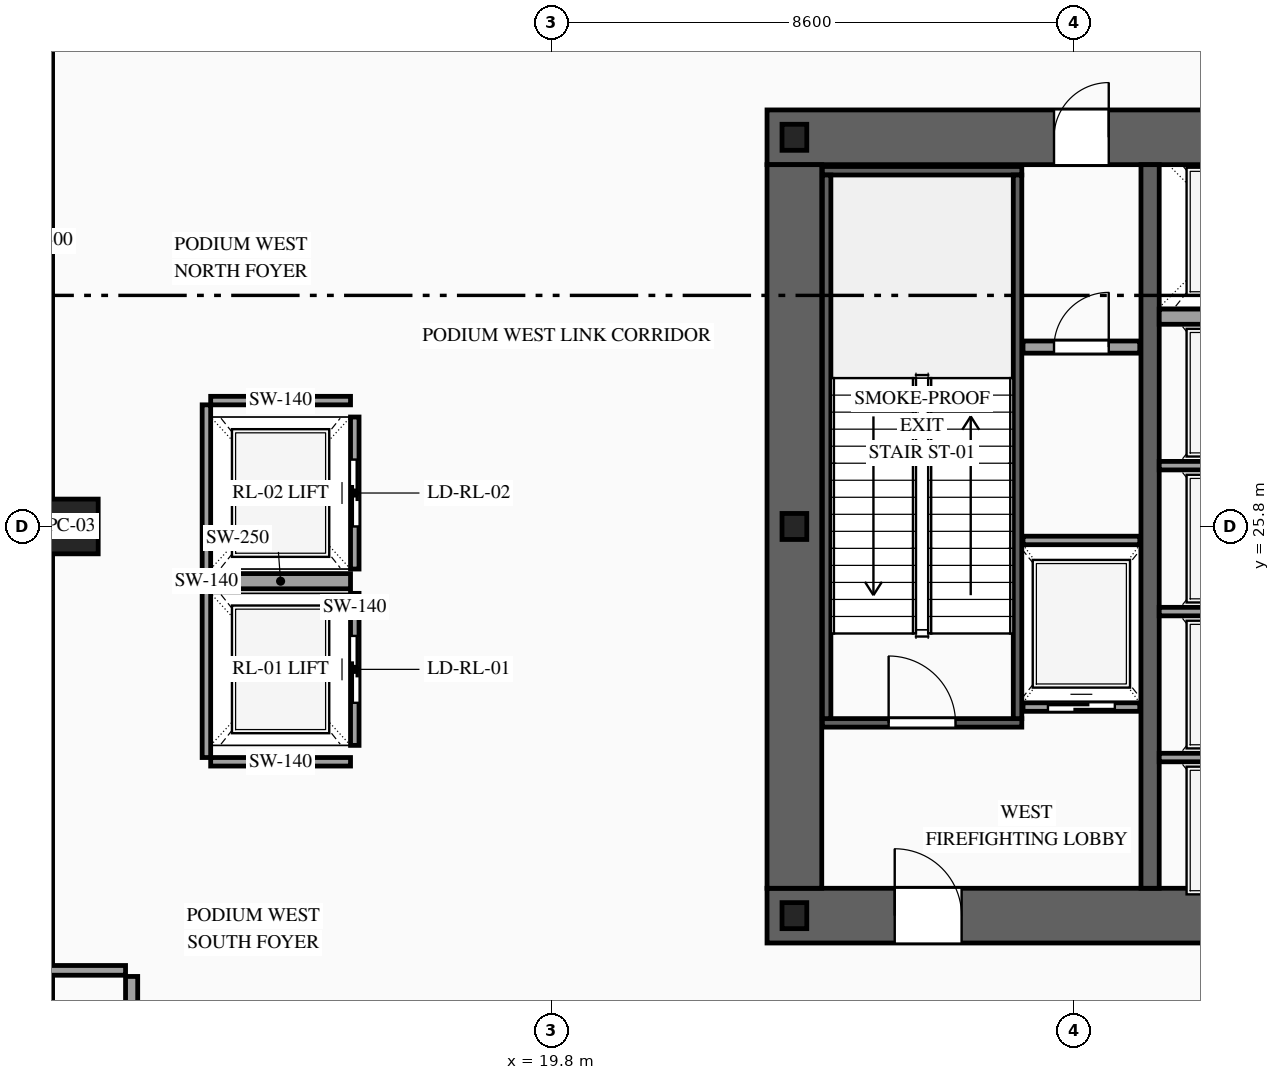
"""IFC4 building model, lengths in metres.
Left out: names, types, materials, properties, quantities, classifications, styles, units other than length and angle.
Written with IfcOpenShell. Run it as: python <this file> out.ifc"""

import sys

from ifc_helpers import new_model, si_unit, direction, frame, frame_2d, origin, origin_2d, place, context, subcontext, project, spatial, rectangle, i_section, extrude, source, transform, mapped, element, fill, save


model = new_model("IFC4")
c1 = context("Model", 3, precision=1e-05, world=origin(), true_north=direction((0.0, 1.0)))
c2 = subcontext(c1, "Body", "Model", "MODEL_VIEW")
j1 = project(units=[si_unit("LENGTHUNIT", "METRE"), si_unit("PLANEANGLEUNIT", "RADIAN")], contexts=[c1])
p1 = place(None, origin())
s1 = spatial("IfcSite", under=j1, at=p1, CompositionType="ELEMENT")
p2 = place(p1, origin())
s2 = spatial("IfcBuilding", under=s1, at=p2, CompositionType="ELEMENT")
p3 = place(p2, origin())
s3 = spatial("IfcBuildingStorey", under=s2, at=p3, CompositionType="ELEMENT", Elevation=0.0)
p4 = place(p3, frame((23.35, 19.4, 0.0), z_axis=(0.0, 0.0, 1.0), x_axis=(1.0, 0.0, 0.0)))
e1 = element("IfcWall", 1, at=p4, inside=s3, PredefinedType="SHEAR", context=c2, shape_type="SweptSolid", body=[
    extrude(rectangle(XDim=27.3, YDim=0.9, at=frame_2d((13.65, 0.0))), origin(), (0.0, 0.0, 1.0), 5.4),
])
p5 = place(p4, frame((2.1, 0.0, 0.0)))
e2 = element("IfcOpeningElement", 2, at=p5, cuts=e1, PredefinedType="OPENING", context=c2, shape_type="SweptSolid", body=[
    extrude(rectangle(XDim=1.1, YDim=2.2, at=frame_2d((0.55, 1.1))), frame((0.0, 0.465, 0.0), z_axis=(0.0, -1.0, 0.0), x_axis=(1.0, 0.0, 0.0)), (0.0, 0.0, 1.0), 0.93),
])
p6 = place(p4, frame((10.0, 0.0, 0.0)))
e3 = element("IfcOpeningElement", 3, at=p6, cuts=e1, PredefinedType="OPENING", context=c2, shape_type="SweptSolid", body=[
    extrude(rectangle(XDim=1.1, YDim=2.2, at=frame_2d((0.55, 1.1))), frame((0.0, 0.465, 0.0), z_axis=(0.0, -1.0, 0.0), x_axis=(1.0, 0.0, 0.0)), (0.0, 0.0, 1.0), 0.93),
])
p7 = place(p4, frame((23.2, 0.0, 0.0)))
e4 = element("IfcOpeningElement", 4, at=p7, cuts=e1, PredefinedType="OPENING", context=c2, shape_type="SweptSolid", body=[
    extrude(rectangle(XDim=1.1, YDim=2.2, at=frame_2d((0.55, 1.1))), frame((0.0, 0.465, 0.0), z_axis=(0.0, -1.0, 0.0), x_axis=(1.0, 0.0, 0.0)), (0.0, 0.0, 1.0), 0.93),
])
p8 = place(p4, frame((19.82, 0.0, 0.0)))
e5 = element("IfcOpeningElement", 5, at=p8, cuts=e1, PredefinedType="OPENING", context=c2, shape_type="SweptSolid", body=[
    extrude(rectangle(XDim=0.9, YDim=2.15, at=frame_2d((0.45, 1.075))), frame((0.0, 0.465, 0.0), z_axis=(0.0, -1.0, 0.0), x_axis=(1.0, 0.0, 0.0)), (0.0, 0.0, 1.0), 0.93),
])
p9 = place(p4, frame((18.38, 0.0, 0.0)))
e6 = element("IfcOpeningElement", 6, at=p9, cuts=e1, PredefinedType="OPENING", context=c2, shape_type="SweptSolid", body=[
    extrude(rectangle(XDim=0.9, YDim=2.15, at=frame_2d((0.45, 1.075))), frame((0.0, 0.465, 0.0), z_axis=(0.0, -1.0, 0.0), x_axis=(1.0, 0.0, 0.0)), (0.0, 0.0, 1.0), 0.93),
])
p10 = place(p3, frame((23.35, 32.2, 0.0), z_axis=(0.0, 0.0, 1.0), x_axis=(1.0, 0.0, 0.0)))
e7 = element("IfcWall", 7, at=p10, inside=s3, PredefinedType="SHEAR", context=c2, shape_type="SweptSolid", body=[
    extrude(rectangle(XDim=27.3, YDim=0.9, at=frame_2d((13.65, 0.0))), origin(), (0.0, 0.0, 1.0), 5.4),
])
p11 = place(p10, frame((4.72, 0.0, 0.0)))
e8 = element("IfcOpeningElement", 8, at=p11, cuts=e7, PredefinedType="OPENING", context=c2, shape_type="SweptSolid", body=[
    extrude(rectangle(XDim=0.9, YDim=2.15, at=frame_2d((0.45, 1.075))), frame((0.0, 0.465, 0.0), z_axis=(0.0, -1.0, 0.0), x_axis=(1.0, 0.0, 0.0)), (0.0, 0.0, 1.0), 0.93),
])
p12 = place(p10, frame((10.0, 0.0, 0.0)))
e9 = element("IfcOpeningElement", 9, at=p12, cuts=e7, PredefinedType="OPENING", context=c2, shape_type="SweptSolid", body=[
    extrude(rectangle(XDim=1.1, YDim=2.2, at=frame_2d((0.55, 1.1))), frame((0.0, 0.465, 0.0), z_axis=(0.0, -1.0, 0.0), x_axis=(1.0, 0.0, 0.0)), (0.0, 0.0, 1.0), 0.93),
])
p13 = place(p10, frame((15.85, 0.0, 0.0)))
e10 = element("IfcOpeningElement", 10, at=p13, cuts=e7, PredefinedType="OPENING", context=c2, shape_type="SweptSolid", body=[
    extrude(rectangle(XDim=1.1, YDim=2.2, at=frame_2d((0.55, 1.1))), frame((0.0, 0.465, 0.0), z_axis=(0.0, -1.0, 0.0), x_axis=(1.0, 0.0, 0.0)), (0.0, 0.0, 1.0), 0.93),
])
p14 = place(p10, frame((18.95, 0.0, 0.0)))
e11 = element("IfcOpeningElement", 11, at=p14, cuts=e7, PredefinedType="OPENING", context=c2, shape_type="SweptSolid", body=[
    extrude(rectangle(XDim=1.1, YDim=2.2, at=frame_2d((0.55, 1.1))), frame((0.0, 0.465, 0.0), z_axis=(0.0, -1.0, 0.0), x_axis=(1.0, 0.0, 0.0)), (0.0, 0.0, 1.0), 0.93),
])
m1 = source(origin(), c2, "Body", "SweptSolid", [
    extrude(rectangle(XDim=11.9, YDim=0.9, at=frame_2d((5.95, 0.0))), origin(), (0.0, 0.0, 1.0), 5.4),
])
p15 = place(p3, frame((23.8, 19.85, 0.0), z_axis=(0.0, 0.0, 1.0), x_axis=(0.0, 1.0, 0.0)))
e12 = element("IfcWall", 12, at=p15, inside=s3, PredefinedType="SHEAR", context=c2, shape_type="MappedRepresentation", body=[
    mapped(m1, transform((0.0, 0.0, 0.0), scale=1.0)),
])
m2 = source(origin(), c2, "Body", "SweptSolid", [
    extrude(rectangle(XDim=11.9, YDim=0.3, at=frame_2d((5.95, 0.0))), origin(), (0.0, 0.0, 1.0), 5.4),
])
p16 = place(p3, frame((29.65, 19.85, 0.0), z_axis=(0.0, 0.0, 1.0), x_axis=(0.0, 1.0, 0.0)))
e13 = element("IfcWall", 13, at=p16, inside=s3, PredefinedType="SOLIDWALL", context=c2, shape_type="MappedRepresentation", body=[
    mapped(m2, transform((0.0, 0.0, 0.0), scale=1.0)),
])
m3 = source(origin(), c2, "Body", "SweptSolid", [
    extrude(i_section(OverallWidth=0.407, OverallDepth=0.428, WebThickness=0.02, FlangeThickness=0.035, at=origin_2d()), origin(), (0.0, 0.0, 1.0), 5.4),
])
for number, where, z_axis, x_axis in (
    (14, (23.8, 19.4, 0.0), (0.0, 0.0, 1.0), (1.0, 0.0, 0.0)),
    (15, (23.8, 25.8, 0.0), (0.0, 0.0, 1.0), (1.0, 0.0, 0.0)),
    (16, (23.8, 32.2, 0.0), (0.0, 0.0, 1.0), (1.0, 0.0, 0.0)),
):
    element("IfcColumn", number, at=place(p3, frame(where, z_axis=z_axis, x_axis=x_axis)), inside=s3, PredefinedType="COLUMN", context=c2, shape_type="MappedRepresentation", body=[
        mapped(m3, transform((0.0, 0.0, 0.0), scale=1.0)),
    ])
m4 = source(origin(), c2, "Body", "SweptSolid", [
    extrude(rectangle(XDim=0.9, YDim=0.9, at=origin_2d()), origin(), (0.0, 0.0, 1.0), 5.4),
])
p17 = place(p3, frame((11.9, 25.8, 0.0), z_axis=(0.0, 0.0, 1.0), x_axis=(1.0, 0.0, 0.0)))
e17 = element("IfcColumn", 17, at=p17, inside=s3, PredefinedType="COLUMN", context=c2, shape_type="MappedRepresentation", body=[
    mapped(m4, transform((0.0, 0.0, 0.0), scale=1.0)),
])
p18 = place(p3, frame((27.56, 22.83, 0.0), z_axis=(0.0, 0.0, 1.0), x_axis=(1.0, 0.0, 0.0)))
e18 = element("IfcWall", 18, at=p18, inside=s3, PredefinedType="SOLIDWALL", context=c2, shape_type="SweptSolid", body=[
    extrude(rectangle(XDim=1.92, YDim=0.14, at=frame_2d((0.96, 0.0))), origin(), (0.0, 0.0, 1.0), 5.12),
])
p19 = place(p18, frame((0.41, 0.0, 0.0)))
e19 = element("IfcOpeningElement", 19, at=p19, cuts=e18, PredefinedType="OPENING", context=c2, shape_type="SweptSolid", body=[
    extrude(rectangle(XDim=1.1, YDim=2.2, at=frame_2d((0.55, 1.1))), frame((0.0, 0.085, 0.0), z_axis=(0.0, -1.0, 0.0), x_axis=(1.0, 0.0, 0.0)), (0.0, 0.0, 1.0), 0.17),
])
m5 = source(origin(), c2, "Body", "SweptSolid", [
    extrude(rectangle(XDim=1.92, YDim=0.14, at=frame_2d((0.96, 0.0))), origin(), (0.0, 0.0, 1.0), 5.12),
])
p20 = place(p3, frame((27.56, 25.57, 0.0), z_axis=(0.0, 0.0, 1.0), x_axis=(1.0, 0.0, 0.0)))
e20 = element("IfcWall", 20, at=p20, inside=s3, PredefinedType="SOLIDWALL", context=c2, shape_type="MappedRepresentation", body=[
    mapped(m5, transform((0.0, 0.0, 0.0), scale=1.0)),
])
m6 = source(origin(), c2, "Body", "SweptSolid", [
    extrude(rectangle(XDim=2.5, YDim=0.14, at=frame_2d((1.25, 0.0))), origin(), (0.0, 0.0, 1.0), 5.12),
])
for number, where, z_axis, x_axis in (
    (21, (29.8, 22.0, 0.0), (0.0, 0.0, 1.0), (1.0, 0.0, 0.0)),
    (22, (29.8, 24.4, 0.0), (0.0, 0.0, 1.0), (1.0, 0.0, 0.0)),
    (23, (29.8, 26.8, 0.0), (0.0, 0.0, 1.0), (1.0, 0.0, 0.0)),
):
    element("IfcWall", number, at=place(p3, frame(where, z_axis=z_axis, x_axis=x_axis)), inside=s3, PredefinedType="SOLIDWALL", context=c2, shape_type="MappedRepresentation", body=[
        mapped(m6, transform((0.0, 0.0, 0.0), scale=1.0)),
    ])
m7 = source(origin(), c2, "Body", "SweptSolid", [
    extrude(rectangle(XDim=2.5, YDim=0.25, at=frame_2d((1.25, 0.0))), origin(), (0.0, 0.0, 1.0), 5.12),
])
p21 = place(p3, frame((29.8, 29.25, 0.0), z_axis=(0.0, 0.0, 1.0), x_axis=(1.0, 0.0, 0.0)))
e24 = element("IfcWall", 24, at=p21, inside=s3, PredefinedType="SOLIDWALL", context=c2, shape_type="MappedRepresentation", body=[
    mapped(m7, transform((0.0, 0.0, 0.0), scale=1.0)),
])
p22 = place(p3, frame((16.57, 22.2, 0.0), z_axis=(0.0, 0.0, 1.0), x_axis=(0.0, 1.0, 0.0)))
e25 = element("IfcWall", 25, at=p22, inside=s3, PredefinedType="SOLIDWALL", context=c2, shape_type="SweptSolid", body=[
    extrude(rectangle(XDim=2.5, YDim=0.14, at=frame_2d((1.25, 0.0))), origin(), (0.0, 0.0, 1.0), 5.12),
])
p23 = place(p22, frame((0.7, 0.0, 0.0)))
e26 = element("IfcOpeningElement", 26, at=p23, cuts=e25, PredefinedType="OPENING", context=c2, shape_type="SweptSolid", body=[
    extrude(rectangle(XDim=1.1, YDim=2.2, at=frame_2d((0.55, 1.1))), frame((0.0, 0.085, 0.0), z_axis=(0.0, -1.0, 0.0), x_axis=(1.0, 0.0, 0.0)), (0.0, 0.0, 1.0), 0.17),
])
m8 = source(origin(), c2, "Body", "SweptSolid", [
    extrude(rectangle(XDim=2.3, YDim=0.25, at=frame_2d((1.15, 0.0))), origin(), (0.0, 0.0, 1.0), 5.12),
])
p24 = place(p3, frame((14.2, 24.9, 0.0), z_axis=(0.0, 0.0, 1.0), x_axis=(1.0, 0.0, 0.0)))
e27 = element("IfcWall", 27, at=p24, inside=s3, PredefinedType="SOLIDWALL", context=c2, shape_type="MappedRepresentation", body=[
    mapped(m8, transform((0.0, 0.0, 0.0), scale=1.0)),
])
m9 = source(origin(), c2, "Body", "SweptSolid", [
    extrude(rectangle(XDim=5.8, YDim=0.14, at=frame_2d((2.9, 0.0))), origin(), (0.0, 0.0, 1.0), 5.12),
])
p25 = place(p3, frame((14.13, 22.0, 0.0), z_axis=(0.0, 0.0, 1.0), x_axis=(0.0, 1.0, 0.0)))
e28 = element("IfcWall", 28, at=p25, inside=s3, PredefinedType="SOLIDWALL", context=c2, shape_type="MappedRepresentation", body=[
    mapped(m9, transform((0.0, 0.0, 0.0), scale=1.0)),
])
m10 = source(origin(), c2, "Body", "SweptSolid", [
    extrude(rectangle(XDim=2.3, YDim=0.14, at=frame_2d((1.15, 0.0))), origin(), (0.0, 0.0, 1.0), 5.12),
])
p26 = place(p3, frame((14.2, 21.93, 0.0), z_axis=(0.0, 0.0, 1.0), x_axis=(1.0, 0.0, 0.0)))
e29 = element("IfcWall", 29, at=p26, inside=s3, PredefinedType="SOLIDWALL", context=c2, shape_type="MappedRepresentation", body=[
    mapped(m10, transform((0.0, 0.0, 0.0), scale=1.0)),
])
p27 = place(p3, frame((16.57, 25.1, 0.0), z_axis=(0.0, 0.0, 1.0), x_axis=(0.0, 1.0, 0.0)))
e30 = element("IfcWall", 30, at=p27, inside=s3, PredefinedType="SOLIDWALL", context=c2, shape_type="SweptSolid", body=[
    extrude(rectangle(XDim=2.5, YDim=0.14, at=frame_2d((1.25, 0.0))), origin(), (0.0, 0.0, 1.0), 5.12),
])
p28 = place(p27, frame((0.7, 0.0, 0.0)))
e31 = element("IfcOpeningElement", 31, at=p28, cuts=e30, PredefinedType="OPENING", context=c2, shape_type="SweptSolid", body=[
    extrude(rectangle(XDim=1.1, YDim=2.2, at=frame_2d((0.55, 1.1))), frame((0.0, 0.085, 0.0), z_axis=(0.0, -1.0, 0.0), x_axis=(1.0, 0.0, 0.0)), (0.0, 0.0, 1.0), 0.17),
])
p29 = place(p3, frame((14.2, 27.87, 0.0), z_axis=(0.0, 0.0, 1.0), x_axis=(1.0, 0.0, 0.0)))
e32 = element("IfcWall", 32, at=p29, inside=s3, PredefinedType="SOLIDWALL", context=c2, shape_type="MappedRepresentation", body=[
    mapped(m10, transform((0.0, 0.0, 0.0), scale=1.0)),
])
p30 = place(p3, frame((24.26, 22.57, 0.0), z_axis=(0.0, 0.0, 1.0), x_axis=(1.0, 0.0, 0.0)))
e33 = element("IfcWall", 33, at=p30, inside=s3, PredefinedType="SOLIDWALL", context=c2, shape_type="SweptSolid", body=[
    extrude(rectangle(XDim=3.28, YDim=0.14, at=frame_2d((1.64, 0.0))), origin(), (0.0, 0.0, 1.0), 5.12),
])
p31 = place(p30, frame((1.09, 0.0, 0.0)))
e34 = element("IfcOpeningElement", 34, at=p31, cuts=e33, PredefinedType="OPENING", context=c2, shape_type="SweptSolid", body=[
    extrude(rectangle(XDim=1.1, YDim=2.2, at=frame_2d((0.55, 1.1))), frame((0.0, 0.085, 0.0), z_axis=(0.0, -1.0, 0.0), x_axis=(1.0, 0.0, 0.0)), (0.0, 0.0, 1.0), 0.17),
])
m11 = source(origin(), c2, "Body", "SweptSolid", [
    extrude(rectangle(XDim=3.28, YDim=0.14, at=frame_2d((1.64, 0.0))), origin(), (0.0, 0.0, 1.0), 5.12),
])
p32 = place(p3, frame((24.26, 31.65, 0.0), z_axis=(0.0, 0.0, 1.0), x_axis=(1.0, 0.0, 0.0)))
e35 = element("IfcWall", 35, at=p32, inside=s3, PredefinedType="SOLIDWALL", context=c2, shape_type="MappedRepresentation", body=[
    mapped(m11, transform((0.0, 0.0, 0.0), scale=1.0)),
])
m12 = source(origin(), c2, "Body", "SweptSolid", [
    extrude(rectangle(XDim=8.94, YDim=0.14, at=frame_2d((4.47, 0.0))), origin(), (0.0, 0.0, 1.0), 5.12),
])
for number, where, z_axis, x_axis in (
    (36, (24.33, 22.64, 0.0), (0.0, 0.0, 1.0), (0.0, 1.0, 0.0)),
    (37, (27.47, 22.64, 0.0), (0.0, 0.0, 1.0), (0.0, 1.0, 0.0)),
):
    element("IfcWall", number, at=place(p3, frame(where, z_axis=z_axis, x_axis=x_axis)), inside=s3, PredefinedType="SOLIDWALL", context=c2, shape_type="MappedRepresentation", body=[
        mapped(m12, transform((0.0, 0.0, 0.0), scale=1.0)),
    ])
p33 = place(p3, frame((27.56, 28.75, 0.0), z_axis=(0.0, 0.0, 1.0), x_axis=(1.0, 0.0, 0.0)))
e38 = element("IfcWall", 38, at=p33, inside=s3, PredefinedType="PARTITIONING", context=c2, shape_type="SweptSolid", body=[
    extrude(rectangle(XDim=1.92, YDim=0.2, at=frame_2d((0.96, 0.0))), origin(), (0.0, 0.0, 1.0), 5.12),
])
p34 = place(p33, frame((0.51, 0.0, 0.0)))
e39 = element("IfcOpeningElement", 39, at=p34, cuts=e38, PredefinedType="OPENING", context=c2, shape_type="SweptSolid", body=[
    extrude(rectangle(XDim=0.9, YDim=2.15, at=frame_2d((0.45, 1.075))), frame((0.0, 0.115, 0.0), z_axis=(0.0, -1.0, 0.0), x_axis=(1.0, 0.0, 0.0)), (0.0, 0.0, 1.0), 0.23),
])
p35 = place(p3, frame((12.9, 18.4, 0.0), z_axis=(0.0, 0.0, 1.0), x_axis=(0.0, -1.0, 0.0)))
e40 = element("IfcWall", 40, at=p35, inside=s3, PredefinedType="PARTITIONING", context=c2, shape_type="SweptSolid", body=[
    extrude(rectangle(XDim=6.4, YDim=0.2, at=frame_2d((3.2, 0.0))), origin(), (0.0, 0.0, 1.0), 5.12),
])
p36 = place(p35, frame((2.1, 0.0, 0.0)))
e41 = element("IfcOpeningElement", 41, at=p36, cuts=e40, PredefinedType="OPENING", context=c2, shape_type="SweptSolid", body=[
    extrude(rectangle(XDim=1.0, YDim=2.2, at=frame_2d((0.5, 1.1))), frame((0.0, 0.115, 0.0), z_axis=(0.0, -1.0, 0.0), x_axis=(1.0, 0.0, 0.0)), (0.0, 0.0, 1.0), 0.23),
])
m13 = source(origin(), c2, "Body", "SweptSolid", [
    extrude(rectangle(XDim=10.62, YDim=0.16, at=frame_2d((5.31, 0.0))), origin(), (0.0, 0.0, 1.0), 5.12),
])
p37 = place(p3, frame((2.18, 18.5, 0.0), z_axis=(0.0, 0.0, 1.0), x_axis=(1.0, 0.0, 0.0)))
e42 = element("IfcWall", 42, at=p37, inside=s3, PredefinedType="PARTITIONING", context=c2, shape_type="MappedRepresentation", body=[
    mapped(m13, transform((0.0, 0.0, 0.0), scale=1.0)),
])
m14 = source(origin(), c2, "Body", "SweptSolid", [
    extrude(rectangle(XDim=1.1, YDim=2.2, at=frame_2d((0.55, 1.1))), frame((0.0, 0.025, 0.0), z_axis=(0.0, -1.0, 0.0), x_axis=(1.0, 0.0, 0.0)), (0.0, 0.0, 1.0), 0.05),
])
p38 = place(p19, origin())
e43 = element("IfcDoor", 43, at=p38, inside=s3, OperationType="SLIDING_TO_LEFT", PredefinedType="DOOR", context=c2, shape_type="MappedRepresentation", body=[
    mapped(m14, transform((0.0, 0.0, 0.0), scale=1.0)),
])
fill(e19, e43)
p39 = place(p23, origin())
e44 = element("IfcDoor", 44, at=p39, inside=s3, OperationType="SLIDING_TO_RIGHT", PredefinedType="DOOR", context=c2, shape_type="MappedRepresentation", body=[
    mapped(m14, transform((0.0, 0.0, 0.0), scale=1.0)),
])
fill(e26, e44)
p40 = place(p28, origin())
e45 = element("IfcDoor", 45, at=p40, inside=s3, OperationType="SLIDING_TO_LEFT", PredefinedType="DOOR", context=c2, shape_type="MappedRepresentation", body=[
    mapped(m14, transform((0.0, 0.0, 0.0), scale=1.0)),
])
fill(e31, e45)
m15 = source(origin(), c2, "Body", "SweptSolid", [
    extrude(rectangle(XDim=1.1, YDim=2.2, at=frame_2d((0.55, 1.1))), frame((0.0, 0.025, 0.0), z_axis=(0.0, -1.0, 0.0), x_axis=(1.0, 0.0, 0.0)), (0.0, 0.0, 1.0), 0.05),
])
p41 = place(p31, origin())
e46 = element("IfcDoor", 46, at=p41, inside=s3, OperationType="SINGLE_SWING_LEFT", PredefinedType="DOOR", context=c2, shape_type="MappedRepresentation", body=[
    mapped(m15, transform((0.0, 0.0, 0.0), scale=1.0)),
])
fill(e34, e46)
p42 = place(p5, origin())
e47 = element("IfcDoor", 47, at=p42, inside=s3, OperationType="SINGLE_SWING_LEFT", PredefinedType="DOOR", context=c2, shape_type="MappedRepresentation", body=[
    mapped(m15, transform((0.0, 0.0, 0.0), scale=1.0)),
])
fill(e2, e47)
m16 = source(origin(), c2, "Body", "SweptSolid", [
    extrude(rectangle(XDim=0.9, YDim=2.15, at=frame_2d((0.45, 1.075))), frame((0.0, 0.025, 0.0), z_axis=(0.0, -1.0, 0.0), x_axis=(1.0, 0.0, 0.0)), (0.0, 0.0, 1.0), 0.05),
])
p43 = place(p11, origin())
e48 = element("IfcDoor", 48, at=p43, inside=s3, OperationType="SINGLE_SWING_RIGHT", PredefinedType="DOOR", context=c2, shape_type="MappedRepresentation", body=[
    mapped(m16, transform((0.0, 0.0, 0.0), scale=1.0)),
])
fill(e8, e48)
p44 = place(p34, origin())
e49 = element("IfcDoor", 49, at=p44, inside=s3, OperationType="SINGLE_SWING_RIGHT", PredefinedType="DOOR", context=c2, shape_type="MappedRepresentation", body=[
    mapped(m16, transform((0.0, 0.0, 0.0), scale=1.0)),
])
fill(e39, e49)
save(model, sys.argv[1])
